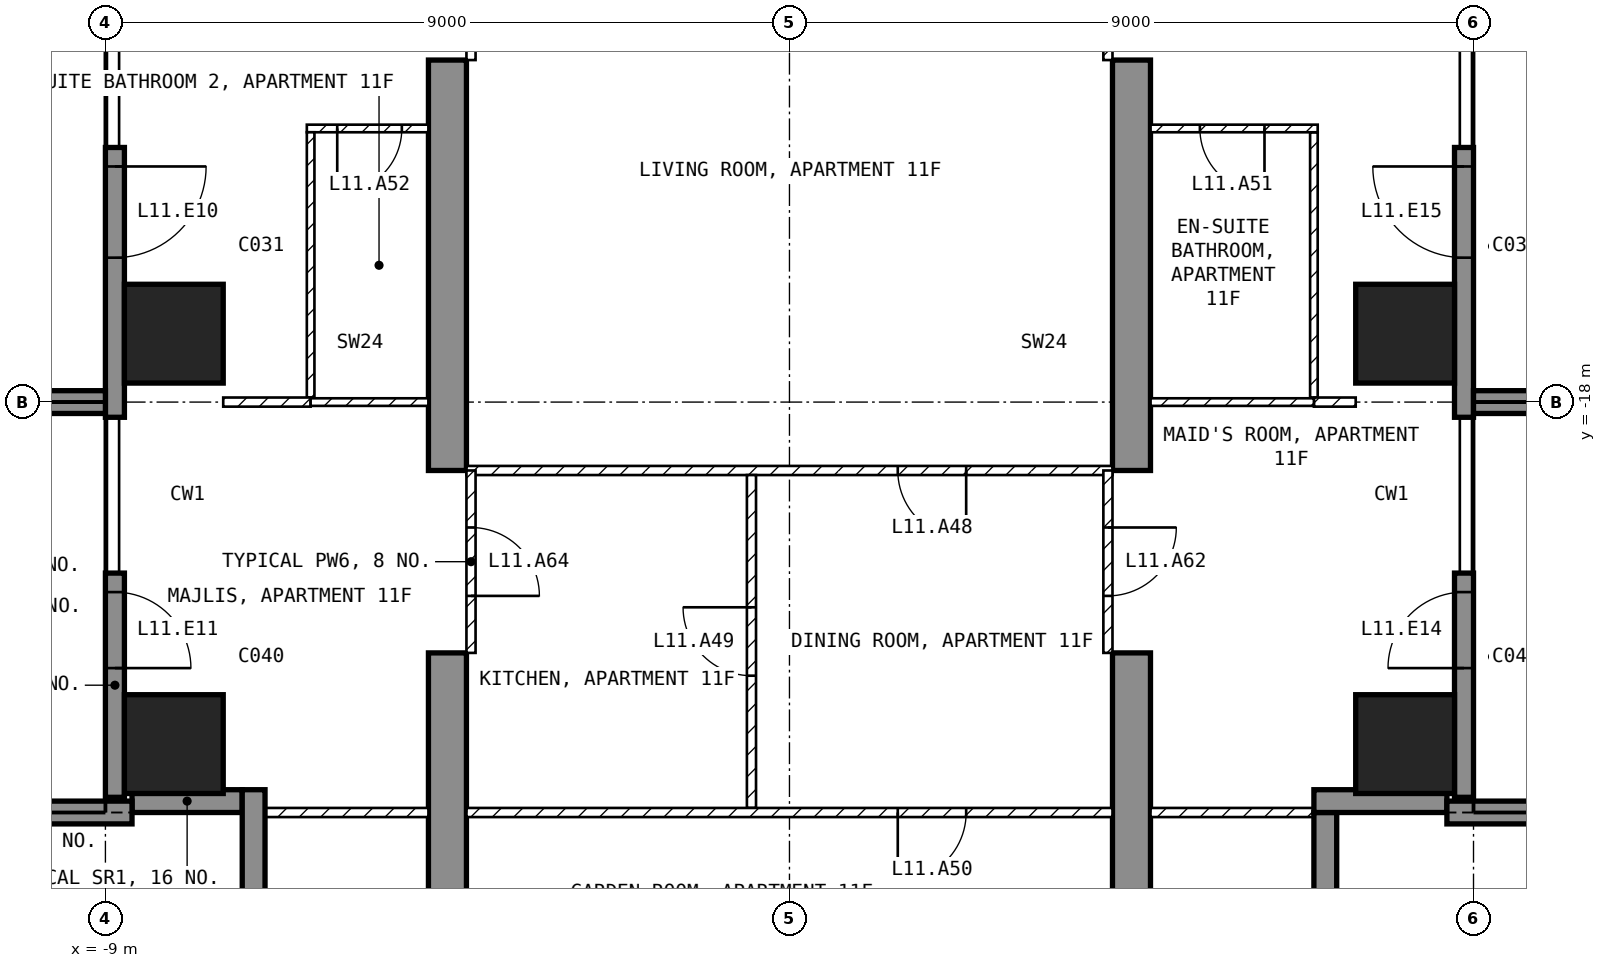
"""IFC4 building model, lengths in metres.
Left out: names, types, materials, properties, quantities, classifications, styles, units other than length and angle.
Written with IfcOpenShell. Run it as: python <this file> out.ifc"""

import sys

from ifc_helpers import new_model, si_unit, direction, frame, frame_2d, origin, origin_2d, place, context, subcontext, project, spatial, polyline, rectangle, outline, extrude, element, fill, save


model = new_model("IFC4")
c1 = context("Model", 3, precision=1e-05, world=origin(), true_north=direction((0.0, 1.0)))
c2 = subcontext(c1, "Body", "Model", "MODEL_VIEW")
j1 = project(units=[si_unit("LENGTHUNIT", "METRE"), si_unit("PLANEANGLEUNIT", "RADIAN")], contexts=[c1])
p1 = place(None, origin())
s1 = spatial("IfcSite", under=j1, at=p1, CompositionType="ELEMENT")
p2 = place(p1, origin())
s2 = spatial("IfcBuilding", under=s1, at=p2, CompositionType="ELEMENT")
p3 = place(p2, frame((0.0, 0.0, 57.5)))
s3 = spatial("IfcBuildingStorey", under=s2, at=p3, CompositionType="ELEMENT", Elevation=57.5)
for number, where, z_axis, x_axis in (
    (1, (-8.1, -22.5, -0.25), (0.0, 0.0, 1.0), (1.0, 0.0, 0.0)),
    (2, (-8.1, -17.1, -0.25), (0.0, 0.0, 1.0), (1.0, 0.0, 0.0)),
    (3, (8.1, -22.5, -0.25), (0.0, 0.0, 1.0), (1.0, 0.0, 0.0)),
    (4, (8.1, -17.1, -0.25), (0.0, 0.0, 1.0), (1.0, 0.0, 0.0)),
):
    element("IfcColumn", number, at=place(p3, frame(where, z_axis=z_axis, x_axis=x_axis)), inside=s3, PredefinedType="COLUMN", context=c2, shape_type="SweptSolid", body=[
        extrude(rectangle(XDim=1.3, YDim=1.3, at=origin_2d()), origin(), (0.0, 0.0, 1.0), 3.5),
    ])
for number, where, z_axis, x_axis in (
    (5, (-4.75, -25.45, -0.25), (1.0, 0.0, 0.0), (0.0, 1.0, 0.0)),
    (6, (4.25, -25.45, -0.25), (1.0, 0.0, 0.0), (0.0, 1.0, 0.0)),
):
    element("IfcWall", number, at=place(p3, frame(where, z_axis=z_axis, x_axis=x_axis)), inside=s3, PredefinedType="SHEAR", context=c2, shape_type="SweptSolid", body=[
        extrude(outline(polyline([(0.0, 0.0), (4.15, 0.0), (4.15, 2.65), (6.55, 2.65), (6.55, 0.0), (11.95, 0.0), (11.95, 2.65), (14.35, 2.65), (14.35, 0.0), (16.45, 0.0), (16.45, 3.5), (0.0, 3.5), (0.0, 0.0)])), origin(), (0.0, 0.0, 1.0), 0.5),
    ])
p4 = place(p3, frame((-8.875, -14.65, 0.0), z_axis=(0.0, 0.0, 1.0), x_axis=(0.0, -1.0, 0.0)))
e7 = element("IfcWall", 7, at=p4, inside=s3, PredefinedType="SOLIDWALL", context=c2, shape_type="SweptSolid", body=[
    extrude(rectangle(XDim=3.55, YDim=0.25, at=frame_2d((1.775, 0.0))), origin(), (0.0, 0.0, 1.0), 3.25),
])
p5 = place(p4, frame((0.25, 0.0, 0.0)))
e8 = element("IfcOpeningElement", 8, at=p5, cuts=e7, PredefinedType="OPENING", context=c2, shape_type="SweptSolid", body=[
    extrude(rectangle(XDim=1.2, YDim=2.4, at=frame_2d((0.6, 1.2))), frame((0.0, 0.135, 0.0), z_axis=(0.0, -1.0, 0.0), x_axis=(1.0, 0.0, 0.0)), (0.0, 0.0, 1.0), 0.27),
])
p6 = place(p3, frame((-8.875, -20.25, 0.0), z_axis=(0.0, 0.0, 1.0), x_axis=(0.0, -1.0, 0.0)))
e9 = element("IfcWall", 9, at=p6, inside=s3, PredefinedType="SOLIDWALL", context=c2, shape_type="SweptSolid", body=[
    extrude(rectangle(XDim=2.95, YDim=0.25, at=frame_2d((1.475, 0.0))), origin(), (0.0, 0.0, 1.0), 3.25),
])
p7 = place(p6, frame((0.25, 0.0, 0.0)))
e10 = element("IfcOpeningElement", 10, at=p7, cuts=e9, PredefinedType="OPENING", context=c2, shape_type="SweptSolid", body=[
    extrude(rectangle(XDim=1.0, YDim=2.4, at=frame_2d((0.5, 1.2))), frame((0.0, 0.135, 0.0), z_axis=(0.0, -1.0, 0.0), x_axis=(1.0, 0.0, 0.0)), (0.0, 0.0, 1.0), 0.27),
])
p8 = place(p3, frame((8.875, -23.2, 0.0), z_axis=(0.0, 0.0, 1.0), x_axis=(0.0, 1.0, 0.0)))
e11 = element("IfcWall", 11, at=p8, inside=s3, PredefinedType="SOLIDWALL", context=c2, shape_type="SweptSolid", body=[
    extrude(rectangle(XDim=2.95, YDim=0.25, at=frame_2d((1.475, 0.0))), origin(), (0.0, 0.0, 1.0), 3.25),
])
p9 = place(p8, frame((1.7, 0.0, 0.0)))
e12 = element("IfcOpeningElement", 12, at=p9, cuts=e11, PredefinedType="OPENING", context=c2, shape_type="SweptSolid", body=[
    extrude(rectangle(XDim=1.0, YDim=2.4, at=frame_2d((0.5, 1.2))), frame((0.0, 0.135, 0.0), z_axis=(0.0, -1.0, 0.0), x_axis=(1.0, 0.0, 0.0)), (0.0, 0.0, 1.0), 0.27),
])
p10 = place(p3, frame((8.875, -18.2, 0.0), z_axis=(0.0, 0.0, 1.0), x_axis=(0.0, 1.0, 0.0)))
e13 = element("IfcWall", 13, at=p10, inside=s3, PredefinedType="SOLIDWALL", context=c2, shape_type="SweptSolid", body=[
    extrude(rectangle(XDim=3.55, YDim=0.25, at=frame_2d((1.775, 0.0))), origin(), (0.0, 0.0, 1.0), 3.25),
])
p11 = place(p10, frame((2.1, 0.0, 0.0)))
e14 = element("IfcOpeningElement", 14, at=p11, cuts=e13, PredefinedType="OPENING", context=c2, shape_type="SweptSolid", body=[
    extrude(rectangle(XDim=1.2, YDim=2.4, at=frame_2d((0.6, 1.2))), frame((0.0, 0.135, 0.0), z_axis=(0.0, -1.0, 0.0), x_axis=(1.0, 0.0, 0.0)), (0.0, 0.0, 1.0), 0.27),
])
p12 = place(p3, frame((7.05, -25.2, 0.0), z_axis=(0.0, 0.0, 1.0), x_axis=(0.0, 1.0, 0.0)))
e15 = element("IfcWall", 15, at=p12, inside=s3, PredefinedType="SOLIDWALL", context=c2, shape_type="SweptSolid", body=[
    extrude(rectangle(XDim=1.8, YDim=0.3, at=frame_2d((0.9, 0.0))), origin(), (0.0, 0.0, 1.0), 3.25),
])
p13 = place(p3, frame((6.9, -23.25, 0.0), z_axis=(0.0, 0.0, 1.0), x_axis=(1.0, 0.0, 0.0)))
e16 = element("IfcWall", 16, at=p13, inside=s3, PredefinedType="SOLIDWALL", context=c2, shape_type="SweptSolid", body=[
    extrude(rectangle(XDim=1.75, YDim=0.3, at=frame_2d((0.875, 0.0))), origin(), (0.0, 0.0, 1.0), 3.25),
])
p14 = place(p3, frame((-8.65, -23.25, 0.0), z_axis=(0.0, 0.0, 1.0), x_axis=(1.0, 0.0, 0.0)))
e17 = element("IfcWall", 17, at=p14, inside=s3, PredefinedType="SOLIDWALL", context=c2, shape_type="SweptSolid", body=[
    extrude(rectangle(XDim=1.45, YDim=0.3, at=frame_2d((0.725, 0.0))), origin(), (0.0, 0.0, 1.0), 3.25),
])
p15 = place(p3, frame((-7.05, -23.1, 0.0), z_axis=(0.0, 0.0, 1.0), x_axis=(0.0, -1.0, 0.0)))
e18 = element("IfcWall", 18, at=p15, inside=s3, PredefinedType="SOLIDWALL", context=c2, shape_type="SweptSolid", body=[
    extrude(rectangle(XDim=1.8, YDim=0.3, at=frame_2d((0.9, 0.0))), origin(), (0.0, 0.0, 1.0), 3.25),
])
p16 = place(p3, frame((-8.65, -23.4, 0.0), z_axis=(0.0, 0.0, 1.0), x_axis=(-1.0, 0.0, 0.0)))
e19 = element("IfcWall", 19, at=p16, inside=s3, PredefinedType="SOLIDWALL", context=c2, shape_type="SweptSolid", body=[
    extrude(rectangle(XDim=3.05, YDim=0.3, at=frame_2d((1.525, 0.0))), origin(), (0.0, 0.0, 1.0), 3.25),
])
p17 = place(p3, frame((-9.0, -18.0, 0.0), z_axis=(0.0, 0.0, 1.0), x_axis=(-1.0, 0.0, 0.0)))
e20 = element("IfcWall", 20, at=p17, inside=s3, PredefinedType="SOLIDWALL", context=c2, shape_type="SweptSolid", body=[
    extrude(rectangle(XDim=2.7, YDim=0.3, at=frame_2d((1.35, 0.0))), origin(), (0.0, 0.0, 1.0), 3.25),
])
p18 = place(p3, frame((8.65, -23.4, 0.0), z_axis=(0.0, 0.0, 1.0), x_axis=(1.0, 0.0, 0.0)))
e21 = element("IfcWall", 21, at=p18, inside=s3, PredefinedType="SOLIDWALL", context=c2, shape_type="SweptSolid", body=[
    extrude(rectangle(XDim=3.05, YDim=0.3, at=frame_2d((1.525, 0.0))), origin(), (0.0, 0.0, 1.0), 3.25),
])
p19 = place(p3, frame((9.0, -18.0, 0.0), z_axis=(0.0, 0.0, 1.0), x_axis=(1.0, 0.0, 0.0)))
e22 = element("IfcWall", 22, at=p19, inside=s3, PredefinedType="SOLIDWALL", context=c2, shape_type="SweptSolid", body=[
    extrude(rectangle(XDim=2.7, YDim=0.3, at=frame_2d((1.35, 0.0))), origin(), (0.0, 0.0, 1.0), 3.25),
])
p20 = place(p3, frame((4.25, -18.9, 0.0), z_axis=(0.0, 0.0, 1.0), x_axis=(-1.0, 0.0, 0.0)))
e23 = element("IfcWall", 23, at=p20, inside=s3, PredefinedType="PARTITIONING", context=c2, shape_type="SweptSolid", body=[
    extrude(rectangle(XDim=8.5, YDim=0.12, at=frame_2d((4.25, 0.0))), origin(), (0.0, 0.0, 1.0), 3.25),
])
p21 = place(p20, frame((1.925, 0.0, 0.0)))
e24 = element("IfcOpeningElement", 24, at=p21, cuts=e23, PredefinedType="OPENING", context=c2, shape_type="SweptSolid", body=[
    extrude(rectangle(XDim=0.9, YDim=2.1, at=frame_2d((0.45, 1.05))), frame((0.0, 0.07, 0.0), z_axis=(0.0, -1.0, 0.0), x_axis=(1.0, 0.0, 0.0)), (0.0, 0.0, 1.0), 0.14),
])
p22 = place(p3, frame((-0.5, -23.34, 0.0), z_axis=(0.0, 0.0, 1.0), x_axis=(0.0, 1.0, 0.0)))
e25 = element("IfcWall", 25, at=p22, inside=s3, PredefinedType="PARTITIONING", context=c2, shape_type="SweptSolid", body=[
    extrude(rectangle(XDim=4.38, YDim=0.12, at=frame_2d((2.19, 0.0))), origin(), (0.0, 0.0, 1.0), 3.25),
])
p23 = place(p22, frame((1.74, 0.0, 0.0)))
e26 = element("IfcOpeningElement", 26, at=p23, cuts=e25, PredefinedType="OPENING", context=c2, shape_type="SweptSolid", body=[
    extrude(rectangle(XDim=0.9, YDim=2.1, at=frame_2d((0.45, 1.05))), frame((0.0, 0.07, 0.0), z_axis=(0.0, -1.0, 0.0), x_axis=(1.0, 0.0, 0.0)), (0.0, 0.0, 1.0), 0.14),
])
p24 = place(p3, frame((4.25, -23.4, 0.0), z_axis=(0.0, 0.0, 1.0), x_axis=(-1.0, 0.0, 0.0)))
e27 = element("IfcWall", 27, at=p24, inside=s3, PredefinedType="PARTITIONING", context=c2, shape_type="SweptSolid", body=[
    extrude(rectangle(XDim=8.5, YDim=0.12, at=frame_2d((4.25, 0.0))), origin(), (0.0, 0.0, 1.0), 3.25),
])
p25 = place(p24, frame((1.925, 0.0, 0.0)))
e28 = element("IfcOpeningElement", 28, at=p25, cuts=e27, PredefinedType="OPENING", context=c2, shape_type="SweptSolid", body=[
    extrude(rectangle(XDim=0.9, YDim=2.1, at=frame_2d((0.45, 1.05))), frame((0.0, 0.07, 0.0), z_axis=(0.0, -1.0, 0.0), x_axis=(1.0, 0.0, 0.0)), (0.0, 0.0, 1.0), 0.14),
])
p26 = place(p3, frame((6.9, -17.94, 0.0), z_axis=(0.0, 0.0, 1.0), x_axis=(0.0, 1.0, 0.0)))
e29 = element("IfcWall", 29, at=p26, inside=s3, PredefinedType="PARTITIONING", context=c2, shape_type="SweptSolid", body=[
    extrude(rectangle(XDim=3.49, YDim=0.1, at=frame_2d((1.745, 0.0))), origin(), (0.0, 0.0, 1.0), 3.25),
])
p27 = place(p3, frame((6.95, -14.4, 0.0), z_axis=(0.0, 0.0, 1.0), x_axis=(-1.0, 0.0, 0.0)))
e30 = element("IfcWall", 30, at=p27, inside=s3, PredefinedType="PARTITIONING", context=c2, shape_type="SweptSolid", body=[
    extrude(rectangle(XDim=2.2, YDim=0.1, at=frame_2d((1.1, 0.0))), origin(), (0.0, 0.0, 1.0), 3.25),
])
p28 = place(p27, frame((0.7, 0.0, 0.0)))
e31 = element("IfcOpeningElement", 31, at=p28, cuts=e30, PredefinedType="OPENING", context=c2, shape_type="SweptSolid", body=[
    extrude(rectangle(XDim=0.85, YDim=2.1, at=frame_2d((0.425, 1.05))), frame((0.0, 0.06, 0.0), z_axis=(0.0, -1.0, 0.0), x_axis=(1.0, 0.0, 0.0)), (0.0, 0.0, 1.0), 0.12),
])
p29 = place(p3, frame((7.45, -18.0, 0.0), z_axis=(0.0, 0.0, 1.0), x_axis=(-1.0, 0.0, 0.0)))
e32 = element("IfcWall", 32, at=p29, inside=s3, PredefinedType="PARTITIONING", context=c2, shape_type="SweptSolid", body=[
    extrude(rectangle(XDim=0.55, YDim=0.12, at=frame_2d((0.275, 0.0))), origin(), (0.0, 0.0, 1.0), 3.25),
])
p30 = place(p3, frame((6.9, -18.0, 0.0), z_axis=(0.0, 0.0, 1.0), x_axis=(-1.0, 0.0, 0.0)))
e33 = element("IfcWall", 33, at=p30, inside=s3, PredefinedType="PARTITIONING", context=c2, shape_type="SweptSolid", body=[
    extrude(rectangle(XDim=2.15, YDim=0.1, at=frame_2d((1.075, 0.0))), origin(), (0.0, 0.0, 1.0), 3.25),
])
p31 = place(p3, frame((7.12, -23.4, 0.0), z_axis=(0.0, 0.0, 1.0), x_axis=(-1.0, 0.0, 0.0)))
e34 = element("IfcWall", 34, at=p31, inside=s3, PredefinedType="PARTITIONING", context=c2, shape_type="SweptSolid", body=[
    extrude(rectangle(XDim=2.37, YDim=0.12, at=frame_2d((1.185, 0.0))), origin(), (0.0, 0.0, 1.0), 3.25),
])
p32 = place(p3, frame((-4.75, -14.4, 0.0), z_axis=(0.0, 0.0, 1.0), x_axis=(-1.0, 0.0, 0.0)))
e35 = element("IfcWall", 35, at=p32, inside=s3, PredefinedType="PARTITIONING", context=c2, shape_type="SweptSolid", body=[
    extrude(rectangle(XDim=1.6, YDim=0.1, at=frame_2d((0.8, 0.0))), origin(), (0.0, 0.0, 1.0), 3.25),
])
p33 = place(p32, frame((0.35, 0.0, 0.0)))
e36 = element("IfcOpeningElement", 36, at=p33, cuts=e35, PredefinedType="OPENING", context=c2, shape_type="SweptSolid", body=[
    extrude(rectangle(XDim=0.85, YDim=2.1, at=frame_2d((0.425, 1.05))), frame((0.0, 0.06, 0.0), z_axis=(0.0, -1.0, 0.0), x_axis=(1.0, 0.0, 0.0)), (0.0, 0.0, 1.0), 0.12),
])
p34 = place(p3, frame((-6.3, -14.45, 0.0), z_axis=(0.0, 0.0, 1.0), x_axis=(0.0, -1.0, 0.0)))
e37 = element("IfcWall", 37, at=p34, inside=s3, PredefinedType="PARTITIONING", context=c2, shape_type="SweptSolid", body=[
    extrude(rectangle(XDim=3.49, YDim=0.1, at=frame_2d((1.745, 0.0))), origin(), (0.0, 0.0, 1.0), 3.25),
])
p35 = place(p3, frame((-6.3, -18.0, 0.0), z_axis=(0.0, 0.0, 1.0), x_axis=(-1.0, 0.0, 0.0)))
e38 = element("IfcWall", 38, at=p35, inside=s3, PredefinedType="PARTITIONING", context=c2, shape_type="SweptSolid", body=[
    extrude(rectangle(XDim=1.15, YDim=0.12, at=frame_2d((0.575, 0.0))), origin(), (0.0, 0.0, 1.0), 3.25),
])
p36 = place(p3, frame((-4.75, -18.0, 0.0), z_axis=(0.0, 0.0, 1.0), x_axis=(-1.0, 0.0, 0.0)))
e39 = element("IfcWall", 39, at=p36, inside=s3, PredefinedType="PARTITIONING", context=c2, shape_type="SweptSolid", body=[
    extrude(rectangle(XDim=1.55, YDim=0.1, at=frame_2d((0.775, 0.0))), origin(), (0.0, 0.0, 1.0), 3.25),
])
p37 = place(p3, frame((-4.75, -23.4, 0.0), z_axis=(0.0, 0.0, 1.0), x_axis=(-1.0, 0.0, 0.0)))
e40 = element("IfcWall", 40, at=p37, inside=s3, PredefinedType="PARTITIONING", context=c2, shape_type="SweptSolid", body=[
    extrude(rectangle(XDim=2.37, YDim=0.12, at=frame_2d((1.185, 0.0))), origin(), (0.0, 0.0, 1.0), 3.25),
])
p38 = place(p3, frame((4.19, -11.1, 0.0), z_axis=(0.0, 0.0, 1.0), x_axis=(0.0, -1.0, 0.0)))
e41 = element("IfcWall", 41, at=p38, inside=s3, PredefinedType="PARTITIONING", context=c2, shape_type="SweptSolid", body=[
    extrude(rectangle(XDim=2.4, YDim=0.12, at=frame_2d((1.2, 0.0))), origin(), (0.0, 0.0, 1.0), 2.4),
])
p39 = place(p38, frame((0.75, 0.0, 0.0)))
e42 = element("IfcOpeningElement", 42, at=p39, cuts=e41, PredefinedType="OPENING", context=c2, shape_type="SweptSolid", body=[
    extrude(rectangle(XDim=0.9, YDim=2.1, at=frame_2d((0.45, 1.05))), frame((0.0, 0.07, 0.0), z_axis=(0.0, -1.0, 0.0), x_axis=(1.0, 0.0, 0.0)), (0.0, 0.0, 1.0), 0.14),
])
p40 = place(p3, frame((4.19, -18.9, 0.0), z_axis=(0.0, 0.0, 1.0), x_axis=(0.0, -1.0, 0.0)))
e43 = element("IfcWall", 43, at=p40, inside=s3, PredefinedType="PARTITIONING", context=c2, shape_type="SweptSolid", body=[
    extrude(rectangle(XDim=2.4, YDim=0.12, at=frame_2d((1.2, 0.0))), origin(), (0.0, 0.0, 1.0), 2.4),
])
p41 = place(p40, frame((0.75, 0.0, 0.0)))
e44 = element("IfcOpeningElement", 44, at=p41, cuts=e43, PredefinedType="OPENING", context=c2, shape_type="SweptSolid", body=[
    extrude(rectangle(XDim=0.9, YDim=2.1, at=frame_2d((0.45, 1.05))), frame((0.0, 0.07, 0.0), z_axis=(0.0, -1.0, 0.0), x_axis=(1.0, 0.0, 0.0)), (0.0, 0.0, 1.0), 0.14),
])
p42 = place(p3, frame((-4.19, -11.1, 0.0), z_axis=(0.0, 0.0, 1.0), x_axis=(0.0, -1.0, 0.0)))
e45 = element("IfcWall", 45, at=p42, inside=s3, PredefinedType="PARTITIONING", context=c2, shape_type="SweptSolid", body=[
    extrude(rectangle(XDim=2.4, YDim=0.12, at=frame_2d((1.2, 0.0))), origin(), (0.0, 0.0, 1.0), 2.4),
])
p43 = place(p42, frame((0.75, 0.0, 0.0)))
e46 = element("IfcOpeningElement", 46, at=p43, cuts=e45, PredefinedType="OPENING", context=c2, shape_type="SweptSolid", body=[
    extrude(rectangle(XDim=0.9, YDim=2.1, at=frame_2d((0.45, 1.05))), frame((0.0, 0.07, 0.0), z_axis=(0.0, -1.0, 0.0), x_axis=(1.0, 0.0, 0.0)), (0.0, 0.0, 1.0), 0.14),
])
p44 = place(p3, frame((-4.19, -18.9, 0.0), z_axis=(0.0, 0.0, 1.0), x_axis=(0.0, -1.0, 0.0)))
e47 = element("IfcWall", 47, at=p44, inside=s3, PredefinedType="PARTITIONING", context=c2, shape_type="SweptSolid", body=[
    extrude(rectangle(XDim=2.4, YDim=0.12, at=frame_2d((1.2, 0.0))), origin(), (0.0, 0.0, 1.0), 2.4),
])
p45 = place(p44, frame((0.75, 0.0, 0.0)))
e48 = element("IfcOpeningElement", 48, at=p45, cuts=e47, PredefinedType="OPENING", context=c2, shape_type="SweptSolid", body=[
    extrude(rectangle(XDim=0.9, YDim=2.1, at=frame_2d((0.45, 1.05))), frame((0.0, 0.07, 0.0), z_axis=(0.0, -1.0, 0.0), x_axis=(1.0, 0.0, 0.0)), (0.0, 0.0, 1.0), 0.14),
])
p46 = place(p5, origin())
e49 = element("IfcDoor", 49, at=p46, inside=s3, OperationType="SINGLE_SWING_LEFT", PredefinedType="DOOR", context=c2, shape_type="SweptSolid", body=[
    extrude(rectangle(XDim=1.2, YDim=2.4, at=frame_2d((0.6, 1.2))), frame((0.0, 0.025, 0.0), z_axis=(0.0, -1.0, 0.0), x_axis=(1.0, 0.0, 0.0)), (0.0, 0.0, 1.0), 0.05),
])
fill(e8, e49)
p47 = place(p7, origin())
e50 = element("IfcDoor", 50, at=p47, inside=s3, OperationType="SINGLE_SWING_RIGHT", PredefinedType="DOOR", context=c2, shape_type="SweptSolid", body=[
    extrude(rectangle(XDim=1.0, YDim=2.4, at=frame_2d((0.5, 1.2))), frame((0.0, 0.025, 0.0), z_axis=(0.0, -1.0, 0.0), x_axis=(1.0, 0.0, 0.0)), (0.0, 0.0, 1.0), 0.05),
])
fill(e10, e50)
p48 = place(p9, origin())
e51 = element("IfcDoor", 51, at=p48, inside=s3, OperationType="SINGLE_SWING_LEFT", PredefinedType="DOOR", context=c2, shape_type="SweptSolid", body=[
    extrude(rectangle(XDim=1.0, YDim=2.4, at=frame_2d((0.5, 1.2))), frame((0.0, 0.025, 0.0), z_axis=(0.0, -1.0, 0.0), x_axis=(1.0, 0.0, 0.0)), (0.0, 0.0, 1.0), 0.05),
])
fill(e12, e51)
p49 = place(p11, origin())
e52 = element("IfcDoor", 52, at=p49, inside=s3, OperationType="SINGLE_SWING_RIGHT", PredefinedType="DOOR", context=c2, shape_type="SweptSolid", body=[
    extrude(rectangle(XDim=1.2, YDim=2.4, at=frame_2d((0.6, 1.2))), frame((0.0, 0.025, 0.0), z_axis=(0.0, -1.0, 0.0), x_axis=(1.0, 0.0, 0.0)), (0.0, 0.0, 1.0), 0.05),
])
fill(e14, e52)
p50 = place(p21, origin())
e53 = element("IfcDoor", 53, at=p50, inside=s3, OperationType="SINGLE_SWING_LEFT", PredefinedType="DOOR", context=c2, shape_type="SweptSolid", body=[
    extrude(rectangle(XDim=0.9, YDim=2.1, at=frame_2d((0.45, 1.05))), frame((0.0, 0.025, 0.0), z_axis=(0.0, -1.0, 0.0), x_axis=(1.0, 0.0, 0.0)), (0.0, 0.0, 1.0), 0.05),
])
fill(e24, e53)
p51 = place(p23, origin())
e54 = element("IfcDoor", 54, at=p51, inside=s3, OperationType="SINGLE_SWING_RIGHT", PredefinedType="DOOR", context=c2, shape_type="SweptSolid", body=[
    extrude(rectangle(XDim=0.9, YDim=2.1, at=frame_2d((0.45, 1.05))), frame((0.0, 0.025, 0.0), z_axis=(0.0, -1.0, 0.0), x_axis=(1.0, 0.0, 0.0)), (0.0, 0.0, 1.0), 0.05),
])
fill(e26, e54)
p52 = place(p25, origin())
e55 = element("IfcDoor", 55, at=p52, inside=s3, OperationType="SINGLE_SWING_RIGHT", PredefinedType="DOOR", context=c2, shape_type="SweptSolid", body=[
    extrude(rectangle(XDim=0.9, YDim=2.1, at=frame_2d((0.45, 1.05))), frame((0.0, 0.025, 0.0), z_axis=(0.0, -1.0, 0.0), x_axis=(1.0, 0.0, 0.0)), (0.0, 0.0, 1.0), 0.05),
])
fill(e28, e55)
p53 = place(p28, origin())
e56 = element("IfcDoor", 56, at=p53, inside=s3, OperationType="SINGLE_SWING_LEFT", PredefinedType="DOOR", context=c2, shape_type="SweptSolid", body=[
    extrude(rectangle(XDim=0.85, YDim=2.1, at=frame_2d((0.425, 1.05))), frame((0.0, 0.025, 0.0), z_axis=(0.0, -1.0, 0.0), x_axis=(1.0, 0.0, 0.0)), (0.0, 0.0, 1.0), 0.05),
])
fill(e31, e56)
p54 = place(p33, origin())
e57 = element("IfcDoor", 57, at=p54, inside=s3, OperationType="SINGLE_SWING_RIGHT", PredefinedType="DOOR", context=c2, shape_type="SweptSolid", body=[
    extrude(rectangle(XDim=0.85, YDim=2.1, at=frame_2d((0.425, 1.05))), frame((0.0, 0.025, 0.0), z_axis=(0.0, -1.0, 0.0), x_axis=(1.0, 0.0, 0.0)), (0.0, 0.0, 1.0), 0.05),
])
fill(e36, e57)
p55 = place(p41, origin())
e58 = element("IfcDoor", 58, at=p55, inside=s3, OperationType="SINGLE_SWING_LEFT", PredefinedType="DOOR", context=c2, shape_type="SweptSolid", body=[
    extrude(rectangle(XDim=0.9, YDim=2.1, at=frame_2d((0.45, 1.05))), frame((0.0, 0.025, 0.0), z_axis=(0.0, -1.0, 0.0), x_axis=(1.0, 0.0, 0.0)), (0.0, 0.0, 1.0), 0.05),
])
fill(e44, e58)
p56 = place(p45, origin())
e59 = element("IfcDoor", 59, at=p56, inside=s3, OperationType="SINGLE_SWING_RIGHT", PredefinedType="DOOR", context=c2, shape_type="SweptSolid", body=[
    extrude(rectangle(XDim=0.9, YDim=2.1, at=frame_2d((0.45, 1.05))), frame((0.0, 0.025, 0.0), z_axis=(0.0, -1.0, 0.0), x_axis=(1.0, 0.0, 0.0)), (0.0, 0.0, 1.0), 0.05),
])
fill(e48, e59)
save(model, sys.argv[1])
